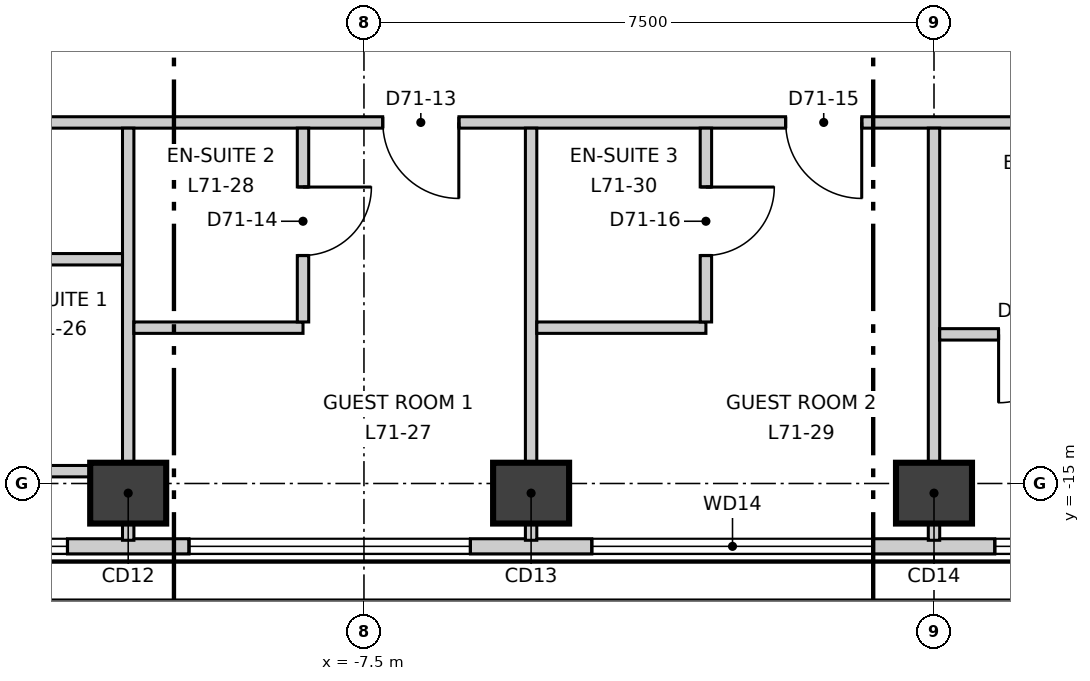
"""IFC4 building model, lengths in metres.
Left out: names, types, materials, properties, quantities, classifications, styles, units other than length and angle.
Written with IfcOpenShell. Run it as: python <this file> out.ifc"""

import sys

from ifc_helpers import new_model, si_unit, direction, frame, frame_2d, origin, origin_2d, place, context, subcontext, project, spatial, rectangle, extrude, element, fill, save


model = new_model("IFC4")
c1 = context("Model", 3, precision=1e-05, world=origin(), true_north=direction((0.0, 1.0)))
c2 = subcontext(c1, "Body", "Model", "MODEL_VIEW")
j1 = project(units=[si_unit("LENGTHUNIT", "METRE"), si_unit("PLANEANGLEUNIT", "RADIAN")], contexts=[c1])
p1 = place(None, origin())
s1 = spatial("IfcSite", under=j1, at=p1, CompositionType="ELEMENT")
p2 = place(p1, origin())
s2 = spatial("IfcBuilding", under=s1, at=p2, CompositionType="ELEMENT")
p3 = place(p2, frame((0.0, 0.0, 300.7)))
s3 = spatial("IfcBuildingStorey", under=s2, at=p3, CompositionType="ELEMENT", Elevation=300.7)
for number, where, z_axis, x_axis in (
    (1, (-10.602, -15.127, -0.3), (0.0, 0.0, 1.0), (1.0, 0.0, 0.0)),
    (2, (-5.301, -15.127, -0.3), (0.0, 0.0, 1.0), (1.0, 0.0, 0.0)),
    (3, (0.0, -15.127, -0.3), (0.0, 0.0, 1.0), (1.0, 0.0, 0.0)),
):
    element("IfcColumn", number, at=place(p3, frame(where, z_axis=z_axis, x_axis=x_axis)), inside=s3, PredefinedType="COLUMN", context=c2, shape_type="SweptSolid", body=[
        extrude(rectangle(XDim=1.0, YDim=0.8, at=origin_2d()), origin(), (0.0, 0.0, 1.0), 3.6),
    ])
p4 = place(p3, frame((-2.453, 27.405, 0.0), z_axis=(0.0, 0.0, 1.0), x_axis=(-0.500000041859, -0.866025379617, 0.0)))
e4 = element("IfcWall", 4, at=p4, inside=s3, PredefinedType="ELEMENTEDWALL", context=c2, shape_type="SweptSolid", body=[
    extrude(rectangle(XDim=44.994, YDim=0.2, at=frame_2d((22.497, 0.0))), origin(), (0.0, 0.0, 1.0), 3.3),
])
p5 = place(p4, frame((2.103, 0.0, 0.9)))
e5 = element("IfcOpeningElement", 5, at=p5, cuts=e4, PredefinedType="OPENING", context=c2, shape_type="SweptSolid", body=[
    extrude(rectangle(XDim=3.7, YDim=2.2, at=frame_2d((1.85, 1.1))), frame((0.0, 0.11, 0.0), z_axis=(0.0, -1.0, 0.0), x_axis=(1.0, 0.0, 0.0)), (0.0, 0.0, 1.0), 0.22),
])
p6 = place(p4, frame((7.404, 0.0, 0.9)))
e6 = element("IfcOpeningElement", 6, at=p6, cuts=e4, PredefinedType="OPENING", context=c2, shape_type="SweptSolid", body=[
    extrude(rectangle(XDim=3.7, YDim=2.2, at=frame_2d((1.85, 1.1))), frame((0.0, 0.11, 0.0), z_axis=(0.0, -1.0, 0.0), x_axis=(1.0, 0.0, 0.0)), (0.0, 0.0, 1.0), 0.22),
])
p7 = place(p4, frame((12.705, 0.0, 0.9)))
e7 = element("IfcOpeningElement", 7, at=p7, cuts=e4, PredefinedType="OPENING", context=c2, shape_type="SweptSolid", body=[
    extrude(rectangle(XDim=3.7, YDim=2.2, at=frame_2d((1.85, 1.1))), frame((0.0, 0.11, 0.0), z_axis=(0.0, -1.0, 0.0), x_axis=(1.0, 0.0, 0.0)), (0.0, 0.0, 1.0), 0.22),
])
p8 = place(p4, frame((18.006, 0.0, 0.9)))
e8 = element("IfcOpeningElement", 8, at=p8, cuts=e4, PredefinedType="OPENING", context=c2, shape_type="SweptSolid", body=[
    extrude(rectangle(XDim=3.7, YDim=2.2, at=frame_2d((1.85, 1.1))), frame((0.0, 0.11, 0.0), z_axis=(0.0, -1.0, 0.0), x_axis=(1.0, 0.0, 0.0)), (0.0, 0.0, 1.0), 0.22),
])
p9 = place(p4, frame((23.307, 0.0, 0.9)))
e9 = element("IfcOpeningElement", 9, at=p9, cuts=e4, PredefinedType="OPENING", context=c2, shape_type="SweptSolid", body=[
    extrude(rectangle(XDim=3.7, YDim=2.2, at=frame_2d((1.85, 1.1))), frame((0.0, 0.11, 0.0), z_axis=(0.0, -1.0, 0.0), x_axis=(1.0, 0.0, 0.0)), (0.0, 0.0, 1.0), 0.22),
])
p10 = place(p4, frame((28.608, 0.0, 0.9)))
e10 = element("IfcOpeningElement", 10, at=p10, cuts=e4, PredefinedType="OPENING", context=c2, shape_type="SweptSolid", body=[
    extrude(rectangle(XDim=3.7, YDim=2.2, at=frame_2d((1.85, 1.1))), frame((0.0, 0.11, 0.0), z_axis=(0.0, -1.0, 0.0), x_axis=(1.0, 0.0, 0.0)), (0.0, 0.0, 1.0), 0.22),
])
p11 = place(p4, frame((33.909, 0.0, 0.9)))
e11 = element("IfcOpeningElement", 11, at=p11, cuts=e4, PredefinedType="OPENING", context=c2, shape_type="SweptSolid", body=[
    extrude(rectangle(XDim=3.7, YDim=2.2, at=frame_2d((1.85, 1.1))), frame((0.0, 0.11, 0.0), z_axis=(0.0, -1.0, 0.0), x_axis=(1.0, 0.0, 0.0)), (0.0, 0.0, 1.0), 0.22),
])
p12 = place(p4, frame((39.21, 0.0, 0.9)))
e12 = element("IfcOpeningElement", 12, at=p12, cuts=e4, PredefinedType="OPENING", context=c2, shape_type="SweptSolid", body=[
    extrude(rectangle(XDim=3.7, YDim=2.2, at=frame_2d((1.85, 1.1))), frame((0.0, 0.11, 0.0), z_axis=(0.0, -1.0, 0.0), x_axis=(1.0, 0.0, 0.0)), (0.0, 0.0, 1.0), 0.22),
])
p13 = place(p3, frame((-22.507, -15.827, 0.0), z_axis=(0.0, 0.0, 1.0), x_axis=(1.0, 0.0, 0.0)))
e13 = element("IfcWall", 13, at=p13, inside=s3, PredefinedType="ELEMENTEDWALL", context=c2, shape_type="SweptSolid", body=[
    extrude(rectangle(XDim=44.994, YDim=0.2, at=frame_2d((22.497, 0.0))), origin(), (0.0, 0.0, 1.0), 3.3),
])
p14 = place(p13, frame((2.104, 0.0, 0.9)))
e14 = element("IfcOpeningElement", 14, at=p14, cuts=e13, PredefinedType="OPENING", context=c2, shape_type="SweptSolid", body=[
    extrude(rectangle(XDim=3.7, YDim=2.2, at=frame_2d((1.85, 1.1))), frame((0.0, 0.11, 0.0), z_axis=(0.0, -1.0, 0.0), x_axis=(1.0, 0.0, 0.0)), (0.0, 0.0, 1.0), 0.22),
])
p15 = place(p13, frame((7.405, 0.0, 0.9)))
e15 = element("IfcOpeningElement", 15, at=p15, cuts=e13, PredefinedType="OPENING", context=c2, shape_type="SweptSolid", body=[
    extrude(rectangle(XDim=3.7, YDim=2.2, at=frame_2d((1.85, 1.1))), frame((0.0, 0.11, 0.0), z_axis=(0.0, -1.0, 0.0), x_axis=(1.0, 0.0, 0.0)), (0.0, 0.0, 1.0), 0.22),
])
p16 = place(p13, frame((12.706, 0.0, 0.9)))
e16 = element("IfcOpeningElement", 16, at=p16, cuts=e13, PredefinedType="OPENING", context=c2, shape_type="SweptSolid", body=[
    extrude(rectangle(XDim=3.7, YDim=2.2, at=frame_2d((1.85, 1.1))), frame((0.0, 0.11, 0.0), z_axis=(0.0, -1.0, 0.0), x_axis=(1.0, 0.0, 0.0)), (0.0, 0.0, 1.0), 0.22),
])
p17 = place(p13, frame((18.006, 0.0, 0.9)))
e17 = element("IfcOpeningElement", 17, at=p17, cuts=e13, PredefinedType="OPENING", context=c2, shape_type="SweptSolid", body=[
    extrude(rectangle(XDim=3.7, YDim=2.2, at=frame_2d((1.85, 1.1))), frame((0.0, 0.11, 0.0), z_axis=(0.0, -1.0, 0.0), x_axis=(1.0, 0.0, 0.0)), (0.0, 0.0, 1.0), 0.22),
])
p18 = place(p13, frame((23.308, 0.0, 0.9)))
e18 = element("IfcOpeningElement", 18, at=p18, cuts=e13, PredefinedType="OPENING", context=c2, shape_type="SweptSolid", body=[
    extrude(rectangle(XDim=3.7, YDim=2.2, at=frame_2d((1.85, 1.1))), frame((0.0, 0.11, 0.0), z_axis=(0.0, -1.0, 0.0), x_axis=(1.0, 0.0, 0.0)), (0.0, 0.0, 1.0), 0.22),
])
p19 = place(p13, frame((28.608, 0.0, 0.9)))
e19 = element("IfcOpeningElement", 19, at=p19, cuts=e13, PredefinedType="OPENING", context=c2, shape_type="SweptSolid", body=[
    extrude(rectangle(XDim=3.7, YDim=2.2, at=frame_2d((1.85, 1.1))), frame((0.0, 0.11, 0.0), z_axis=(0.0, -1.0, 0.0), x_axis=(1.0, 0.0, 0.0)), (0.0, 0.0, 1.0), 0.22),
])
p20 = place(p13, frame((33.91, 0.0, 0.9)))
e20 = element("IfcOpeningElement", 20, at=p20, cuts=e13, PredefinedType="OPENING", context=c2, shape_type="SweptSolid", body=[
    extrude(rectangle(XDim=3.7, YDim=2.2, at=frame_2d((1.85, 1.1))), frame((0.0, 0.11, 0.0), z_axis=(0.0, -1.0, 0.0), x_axis=(1.0, 0.0, 0.0)), (0.0, 0.0, 1.0), 0.22),
])
p21 = place(p13, frame((39.21, 0.0, 0.9)))
e21 = element("IfcOpeningElement", 21, at=p21, cuts=e13, PredefinedType="OPENING", context=c2, shape_type="SweptSolid", body=[
    extrude(rectangle(XDim=3.7, YDim=2.2, at=frame_2d((1.85, 1.1))), frame((0.0, 0.11, 0.0), z_axis=(0.0, -1.0, 0.0), x_axis=(1.0, 0.0, 0.0)), (0.0, 0.0, 1.0), 0.22),
])
p22 = place(p3, frame((-17.603, -10.25, 0.0), z_axis=(0.0, 0.0, 1.0), x_axis=(1.0, 0.0, 0.0)))
e22 = element("IfcWall", 22, at=p22, inside=s3, PredefinedType="PARTITIONING", context=c2, shape_type="SweptSolid", body=[
    extrude(rectangle(XDim=35.356, YDim=0.15, at=frame_2d((17.678, 0.0))), origin(), (0.0, 0.0, 1.0), 3.3),
])
p23 = place(p22, frame((2.9, 0.0, 0.0)))
e23 = element("IfcOpeningElement", 23, at=p23, cuts=e22, PredefinedType="OPENING", context=c2, shape_type="SweptSolid", body=[
    extrude(rectangle(XDim=1.0, YDim=2.1, at=frame_2d((0.5, 1.05))), frame((0.0, 0.085, 0.0), z_axis=(0.0, -1.0, 0.0), x_axis=(1.0, 0.0, 0.0)), (0.0, 0.0, 1.0), 0.17),
])
p24 = place(p22, frame((10.351, 0.0, 0.0)))
e24 = element("IfcOpeningElement", 24, at=p24, cuts=e22, PredefinedType="OPENING", context=c2, shape_type="SweptSolid", body=[
    extrude(rectangle(XDim=1.0, YDim=2.1, at=frame_2d((0.5, 1.05))), frame((0.0, 0.085, 0.0), z_axis=(0.0, -1.0, 0.0), x_axis=(1.0, 0.0, 0.0)), (0.0, 0.0, 1.0), 0.17),
])
p25 = place(p22, frame((15.652, 0.0, 0.0)))
e25 = element("IfcOpeningElement", 25, at=p25, cuts=e22, PredefinedType="OPENING", context=c2, shape_type="SweptSolid", body=[
    extrude(rectangle(XDim=1.0, YDim=2.1, at=frame_2d((0.5, 1.05))), frame((0.0, 0.085, 0.0), z_axis=(0.0, -1.0, 0.0), x_axis=(1.0, 0.0, 0.0)), (0.0, 0.0, 1.0), 0.17),
])
p26 = place(p22, frame((24.753, 0.0, 0.0)))
e26 = element("IfcOpeningElement", 26, at=p26, cuts=e22, PredefinedType="OPENING", context=c2, shape_type="SweptSolid", body=[
    extrude(rectangle(XDim=1.0, YDim=2.1, at=frame_2d((0.5, 1.05))), frame((0.0, 0.085, 0.0), z_axis=(0.0, -1.0, 0.0), x_axis=(1.0, 0.0, 0.0)), (0.0, 0.0, 1.0), 0.17),
])
p27 = place(p22, frame((31.255, 0.0, 0.0)))
e27 = element("IfcOpeningElement", 27, at=p27, cuts=e22, PredefinedType="OPENING", context=c2, shape_type="SweptSolid", body=[
    extrude(rectangle(XDim=1.0, YDim=2.1, at=frame_2d((0.5, 1.05))), frame((0.0, 0.085, 0.0), z_axis=(0.0, -1.0, 0.0), x_axis=(1.0, 0.0, 0.0)), (0.0, 0.0, 1.0), 0.17),
])
p28 = place(p3, frame((-17.679, -10.12, 0.0), z_axis=(0.0, 0.0, 1.0), x_axis=(0.500008955215, 0.866020233427, 0.0)))
e28 = element("IfcWall", 28, at=p28, inside=s3, PredefinedType="PARTITIONING", context=c2, shape_type="SweptSolid", body=[
    extrude(rectangle(XDim=35.357, YDim=0.15, at=frame_2d((17.679, 0.0))), origin(), (0.0, 0.0, 1.0), 3.3),
])
p29 = place(p28, frame((31.307, 0.0, 0.0)))
e29 = element("IfcOpeningElement", 29, at=p29, cuts=e28, PredefinedType="OPENING", context=c2, shape_type="SweptSolid", body=[
    extrude(rectangle(XDim=1.0, YDim=2.1, at=frame_2d((0.5, 1.05))), frame((0.0, 0.085, 0.0), z_axis=(0.0, -1.0, 0.0), x_axis=(1.0, 0.0, 0.0)), (0.0, 0.0, 1.0), 0.17),
])
p30 = place(p28, frame((20.056, 0.0, 0.0)))
e30 = element("IfcOpeningElement", 30, at=p30, cuts=e28, PredefinedType="OPENING", context=c2, shape_type="SweptSolid", body=[
    extrude(rectangle(XDim=1.0, YDim=2.1, at=frame_2d((0.5, 1.05))), frame((0.0, 0.085, 0.0), z_axis=(0.0, -1.0, 0.0), x_axis=(1.0, 0.0, 0.0)), (0.0, 0.0, 1.0), 0.17),
])
p31 = place(p28, frame((13.253, 0.0, 0.0)))
e31 = element("IfcOpeningElement", 31, at=p31, cuts=e28, PredefinedType="OPENING", context=c2, shape_type="SweptSolid", body=[
    extrude(rectangle(XDim=1.0, YDim=2.1, at=frame_2d((0.5, 1.05))), frame((0.0, 0.085, 0.0), z_axis=(0.0, -1.0, 0.0), x_axis=(1.0, 0.0, 0.0)), (0.0, 0.0, 1.0), 0.17),
])
p32 = place(p28, frame((7.653, 0.0, 0.0)))
e32 = element("IfcOpeningElement", 32, at=p32, cuts=e28, PredefinedType="OPENING", context=c2, shape_type="SweptSolid", body=[
    extrude(rectangle(XDim=1.0, YDim=2.1, at=frame_2d((0.5, 1.05))), frame((0.0, 0.085, 0.0), z_axis=(0.0, -1.0, 0.0), x_axis=(1.0, 0.0, 0.0)), (0.0, 0.0, 1.0), 0.17),
])
p33 = place(p28, frame((2.952, 0.0, 0.0)))
e33 = element("IfcOpeningElement", 33, at=p33, cuts=e28, PredefinedType="OPENING", context=c2, shape_type="SweptSolid", body=[
    extrude(rectangle(XDim=1.0, YDim=2.1, at=frame_2d((0.5, 1.05))), frame((0.0, 0.085, 0.0), z_axis=(0.0, -1.0, 0.0), x_axis=(1.0, 0.0, 0.0)), (0.0, 0.0, 1.0), 0.17),
])
for number, where, z_axis, x_axis in (
    (34, (-10.602, -15.747, 0.0), (0.0, 0.0, 1.0), (0.0, 1.0, 0.0)),
    (35, (-5.301, -15.747, 0.0), (0.0, 0.0, 1.0), (0.0, 1.0, 0.0)),
):
    element("IfcWall", number, at=place(p3, frame(where, z_axis=z_axis, x_axis=x_axis)), inside=s3, PredefinedType="PARTITIONING", context=c2, shape_type="SweptSolid", body=[
        extrude(rectangle(XDim=5.422, YDim=0.15, at=frame_2d((2.711, 0.0))), origin(), (0.0, 0.0, 1.0), 3.3),
    ])
p34 = place(p3, frame((0.0, -15.747, 0.0), z_axis=(0.0, 0.0, 1.0), x_axis=(0.0, 1.0, 0.0)))
e36 = element("IfcWall", 36, at=p34, inside=s3, PredefinedType="PARTITIONING", context=c2, shape_type="SweptSolid", body=[
    extrude(rectangle(XDim=5.422, YDim=0.15, at=frame_2d((2.711, 0.0))), origin(), (0.0, 0.0, 1.0), 2.8),
])
p35 = place(p3, frame((0.075, 20.37, 0.0), z_axis=(0.0, 0.0, 1.0), x_axis=(0.500009775255, -0.866019759965, 0.0)))
e37 = element("IfcWall", 37, at=p35, inside=s3, PredefinedType="PARTITIONING", context=c2, shape_type="SweptSolid", body=[
    extrude(rectangle(XDim=35.207, YDim=0.15, at=frame_2d((17.604, 0.0))), origin(), (0.0, 0.0, 1.0), 3.3),
])
p36 = place(p35, frame((31.307, 0.0, 0.0)))
e38 = element("IfcOpeningElement", 38, at=p36, cuts=e37, PredefinedType="OPENING", context=c2, shape_type="SweptSolid", body=[
    extrude(rectangle(XDim=1.0, YDim=2.1, at=frame_2d((0.5, 1.05))), frame((0.0, 0.085, 0.0), z_axis=(0.0, -1.0, 0.0), x_axis=(1.0, 0.0, 0.0)), (0.0, 0.0, 1.0), 0.17),
])
p37 = place(p35, frame((20.355, 0.0, 0.0)))
e39 = element("IfcOpeningElement", 39, at=p37, cuts=e37, PredefinedType="OPENING", context=c2, shape_type="SweptSolid", body=[
    extrude(rectangle(XDim=1.0, YDim=2.1, at=frame_2d((0.5, 1.05))), frame((0.0, 0.085, 0.0), z_axis=(0.0, -1.0, 0.0), x_axis=(1.0, 0.0, 0.0)), (0.0, 0.0, 1.0), 0.17),
])
p38 = place(p35, frame((24.355, 0.0, 0.0)))
e40 = element("IfcOpeningElement", 40, at=p38, cuts=e37, PredefinedType="OPENING", context=c2, shape_type="SweptSolid", body=[
    extrude(rectangle(XDim=0.9, YDim=2.1, at=frame_2d((0.45, 1.05))), frame((0.0, 0.085, 0.0), z_axis=(0.0, -1.0, 0.0), x_axis=(1.0, 0.0, 0.0)), (0.0, 0.0, 1.0), 0.17),
])
p39 = place(p35, frame((22.255, 0.0, 0.0)))
e41 = element("IfcOpeningElement", 41, at=p39, cuts=e37, PredefinedType="OPENING", context=c2, shape_type="SweptSolid", body=[
    extrude(rectangle(XDim=0.9, YDim=2.1, at=frame_2d((0.45, 1.05))), frame((0.0, 0.085, 0.0), z_axis=(0.0, -1.0, 0.0), x_axis=(1.0, 0.0, 0.0)), (0.0, 0.0, 1.0), 0.17),
])
p40 = place(p35, frame((8.453, 0.0, 0.0)))
e42 = element("IfcOpeningElement", 42, at=p40, cuts=e37, PredefinedType="OPENING", context=c2, shape_type="SweptSolid", body=[
    extrude(rectangle(XDim=1.0, YDim=2.1, at=frame_2d((0.5, 1.05))), frame((0.0, 0.085, 0.0), z_axis=(0.0, -1.0, 0.0), x_axis=(1.0, 0.0, 0.0)), (0.0, 0.0, 1.0), 0.17),
])
p41 = place(p35, frame((13.753, 0.0, 0.0)))
e43 = element("IfcOpeningElement", 43, at=p41, cuts=e37, PredefinedType="OPENING", context=c2, shape_type="SweptSolid", body=[
    extrude(rectangle(XDim=0.9, YDim=2.1, at=frame_2d((0.45, 1.05))), frame((0.0, 0.085, 0.0), z_axis=(0.0, -1.0, 0.0), x_axis=(1.0, 0.0, 0.0)), (0.0, 0.0, 1.0), 0.17),
])
p42 = place(p35, frame((11.553, 0.0, 0.0)))
e44 = element("IfcOpeningElement", 44, at=p42, cuts=e37, PredefinedType="OPENING", context=c2, shape_type="SweptSolid", body=[
    extrude(rectangle(XDim=0.9, YDim=2.1, at=frame_2d((0.45, 1.05))), frame((0.0, 0.085, 0.0), z_axis=(0.0, -1.0, 0.0), x_axis=(1.0, 0.0, 0.0)), (0.0, 0.0, 1.0), 0.17),
])
p43 = place(p35, frame((2.951, 0.0, 0.0)))
e45 = element("IfcOpeningElement", 45, at=p43, cuts=e37, PredefinedType="OPENING", context=c2, shape_type="SweptSolid", body=[
    extrude(rectangle(XDim=1.0, YDim=2.1, at=frame_2d((0.5, 1.05))), frame((0.0, 0.085, 0.0), z_axis=(0.0, -1.0, 0.0), x_axis=(1.0, 0.0, 0.0)), (0.0, 0.0, 1.0), 0.17),
])
for number, where, z_axis, x_axis in (
    (46, (-10.527, -12.95, 0.0), (0.0, 0.0, 1.0), (1.0, 0.0, 0.0)),
    (47, (-5.226, -12.95, 0.0), (0.0, 0.0, 1.0), (1.0, 0.0, 0.0)),
):
    element("IfcWall", number, at=place(p3, frame(where, z_axis=z_axis, x_axis=x_axis)), inside=s3, PredefinedType="PARTITIONING", context=c2, shape_type="SweptSolid", body=[
        extrude(rectangle(XDim=2.225, YDim=0.15, at=frame_2d((1.113, 0.0))), origin(), (0.0, 0.0, 1.0), 3.3),
    ])
p44 = place(p3, frame((-8.302, -12.875, 0.0), z_axis=(0.0, 0.0, 1.0), x_axis=(0.0, 1.0, 0.0)))
e48 = element("IfcWall", 48, at=p44, inside=s3, PredefinedType="PARTITIONING", context=c2, shape_type="SweptSolid", body=[
    extrude(rectangle(XDim=2.55, YDim=0.15, at=frame_2d((1.275, 0.0))), origin(), (0.0, 0.0, 1.0), 3.3),
])
p45 = place(p44, frame((0.875, 0.0, 0.0)))
e49 = element("IfcOpeningElement", 49, at=p45, cuts=e48, PredefinedType="OPENING", context=c2, shape_type="SweptSolid", body=[
    extrude(rectangle(XDim=0.9, YDim=2.1, at=frame_2d((0.45, 1.05))), frame((0.0, 0.085, 0.0), z_axis=(0.0, -1.0, 0.0), x_axis=(1.0, 0.0, 0.0)), (0.0, 0.0, 1.0), 0.17),
])
p46 = place(p3, frame((-13.202, -12.05, 0.0), z_axis=(0.0, 0.0, 1.0), x_axis=(1.0, 0.0, 0.0)))
e50 = element("IfcWall", 50, at=p46, inside=s3, PredefinedType="PARTITIONING", context=c2, shape_type="SweptSolid", body=[
    extrude(rectangle(XDim=2.525, YDim=0.15, at=frame_2d((1.262, 0.0))), origin(), (0.0, 0.0, 1.0), 3.3),
])
p47 = place(p3, frame((-13.127, -14.838, 0.0), z_axis=(0.0, 0.0, 1.0), x_axis=(1.0, 0.0, 0.0)))
e51 = element("IfcWall", 51, at=p47, inside=s3, PredefinedType="PARTITIONING", context=c2, shape_type="SweptSolid", body=[
    extrude(rectangle(XDim=2.45, YDim=0.15, at=frame_2d((1.225, 0.0))), origin(), (0.0, 0.0, 1.0), 2.6),
])
p48 = place(p3, frame((-3.001, -12.875, 0.0), z_axis=(0.0, 0.0, 1.0), x_axis=(0.0, 1.0, 0.0)))
e52 = element("IfcWall", 52, at=p48, inside=s3, PredefinedType="PARTITIONING", context=c2, shape_type="SweptSolid", body=[
    extrude(rectangle(XDim=2.55, YDim=0.15, at=frame_2d((1.275, 0.0))), origin(), (0.0, 0.0, 1.0), 3.3),
])
p49 = place(p48, frame((0.875, 0.0, 0.0)))
e53 = element("IfcOpeningElement", 53, at=p49, cuts=e52, PredefinedType="OPENING", context=c2, shape_type="SweptSolid", body=[
    extrude(rectangle(XDim=0.9, YDim=2.1, at=frame_2d((0.45, 1.05))), frame((0.0, 0.085, 0.0), z_axis=(0.0, -1.0, 0.0), x_axis=(1.0, 0.0, 0.0)), (0.0, 0.0, 1.0), 0.17),
])
p50 = place(p3, frame((0.075, -13.038, 0.0), z_axis=(0.0, 0.0, 1.0), x_axis=(1.0, 0.0, 0.0)))
e54 = element("IfcWall", 54, at=p50, inside=s3, PredefinedType="PARTITIONING", context=c2, shape_type="SweptSolid", body=[
    extrude(rectangle(XDim=2.525, YDim=0.15, at=frame_2d((1.263, 0.0))), origin(), (0.0, 0.0, 1.0), 3.3),
])
p51 = place(p50, frame((0.775, 0.0, 0.0)))
e55 = element("IfcOpeningElement", 55, at=p51, cuts=e54, PredefinedType="OPENING", context=c2, shape_type="SweptSolid", body=[
    extrude(rectangle(XDim=0.9, YDim=2.1, at=frame_2d((0.45, 1.05))), frame((0.0, 0.085, 0.0), z_axis=(0.0, -1.0, 0.0), x_axis=(1.0, 0.0, 0.0)), (0.0, 0.0, 1.0), 0.17),
])
p52 = place(p15, origin())
e56 = element("IfcWindow", 56, at=p52, inside=s3, PartitioningType="SINGLE_PANEL", PredefinedType="WINDOW", context=c2, shape_type="SweptSolid", body=[
    extrude(rectangle(XDim=3.7, YDim=2.2, at=frame_2d((1.85, 1.1))), frame((0.0, 0.03, 0.0), z_axis=(0.0, -1.0, 0.0), x_axis=(1.0, 0.0, 0.0)), (0.0, 0.0, 1.0), 0.06),
])
fill(e15, e56)
p53 = place(p16, origin())
e57 = element("IfcWindow", 57, at=p53, inside=s3, PartitioningType="SINGLE_PANEL", PredefinedType="WINDOW", context=c2, shape_type="SweptSolid", body=[
    extrude(rectangle(XDim=3.7, YDim=2.2, at=frame_2d((1.85, 1.1))), frame((0.0, 0.03, 0.0), z_axis=(0.0, -1.0, 0.0), x_axis=(1.0, 0.0, 0.0)), (0.0, 0.0, 1.0), 0.06),
])
fill(e16, e57)
p54 = place(p17, origin())
e58 = element("IfcWindow", 58, at=p54, inside=s3, PartitioningType="SINGLE_PANEL", PredefinedType="WINDOW", context=c2, shape_type="SweptSolid", body=[
    extrude(rectangle(XDim=3.7, YDim=2.2, at=frame_2d((1.85, 1.1))), frame((0.0, 0.03, 0.0), z_axis=(0.0, -1.0, 0.0), x_axis=(1.0, 0.0, 0.0)), (0.0, 0.0, 1.0), 0.06),
])
fill(e17, e58)
p55 = place(p18, origin())
e59 = element("IfcWindow", 59, at=p55, inside=s3, PartitioningType="SINGLE_PANEL", PredefinedType="WINDOW", context=c2, shape_type="SweptSolid", body=[
    extrude(rectangle(XDim=3.7, YDim=2.2, at=frame_2d((1.85, 1.1))), frame((0.0, 0.03, 0.0), z_axis=(0.0, -1.0, 0.0), x_axis=(1.0, 0.0, 0.0)), (0.0, 0.0, 1.0), 0.06),
])
fill(e18, e59)
p56 = place(p24, origin())
e60 = element("IfcDoor", 60, at=p56, inside=s3, OperationType="SINGLE_SWING_RIGHT", PredefinedType="DOOR", context=c2, shape_type="SweptSolid", body=[
    extrude(rectangle(XDim=1.0, YDim=2.1, at=frame_2d((0.5, 1.05))), frame((0.0, 0.025, 0.0), z_axis=(0.0, -1.0, 0.0), x_axis=(1.0, 0.0, 0.0)), (0.0, 0.0, 1.0), 0.05),
])
fill(e24, e60)
p57 = place(p45, origin())
e61 = element("IfcDoor", 61, at=p57, inside=s3, OperationType="SINGLE_SWING_RIGHT", PredefinedType="DOOR", context=c2, shape_type="SweptSolid", body=[
    extrude(rectangle(XDim=0.9, YDim=2.1, at=frame_2d((0.45, 1.05))), frame((0.0, 0.025, 0.0), z_axis=(0.0, -1.0, 0.0), x_axis=(1.0, 0.0, 0.0)), (0.0, 0.0, 1.0), 0.05),
])
fill(e49, e61)
p58 = place(p25, origin())
e62 = element("IfcDoor", 62, at=p58, inside=s3, OperationType="SINGLE_SWING_RIGHT", PredefinedType="DOOR", context=c2, shape_type="SweptSolid", body=[
    extrude(rectangle(XDim=1.0, YDim=2.1, at=frame_2d((0.5, 1.05))), frame((0.0, 0.025, 0.0), z_axis=(0.0, -1.0, 0.0), x_axis=(1.0, 0.0, 0.0)), (0.0, 0.0, 1.0), 0.05),
])
fill(e25, e62)
p59 = place(p49, origin())
e63 = element("IfcDoor", 63, at=p59, inside=s3, OperationType="SINGLE_SWING_RIGHT", PredefinedType="DOOR", context=c2, shape_type="SweptSolid", body=[
    extrude(rectangle(XDim=0.9, YDim=2.1, at=frame_2d((0.45, 1.05))), frame((0.0, 0.025, 0.0), z_axis=(0.0, -1.0, 0.0), x_axis=(1.0, 0.0, 0.0)), (0.0, 0.0, 1.0), 0.05),
])
fill(e53, e63)
p60 = place(p51, origin())
e64 = element("IfcDoor", 64, at=p60, inside=s3, OperationType="SINGLE_SWING_LEFT", PredefinedType="DOOR", context=c2, shape_type="SweptSolid", body=[
    extrude(rectangle(XDim=0.9, YDim=2.1, at=frame_2d((0.45, 1.05))), frame((0.0, 0.025, 0.0), z_axis=(0.0, -1.0, 0.0), x_axis=(1.0, 0.0, 0.0)), (0.0, 0.0, 1.0), 0.05),
])
fill(e55, e64)
save(model, sys.argv[1])
